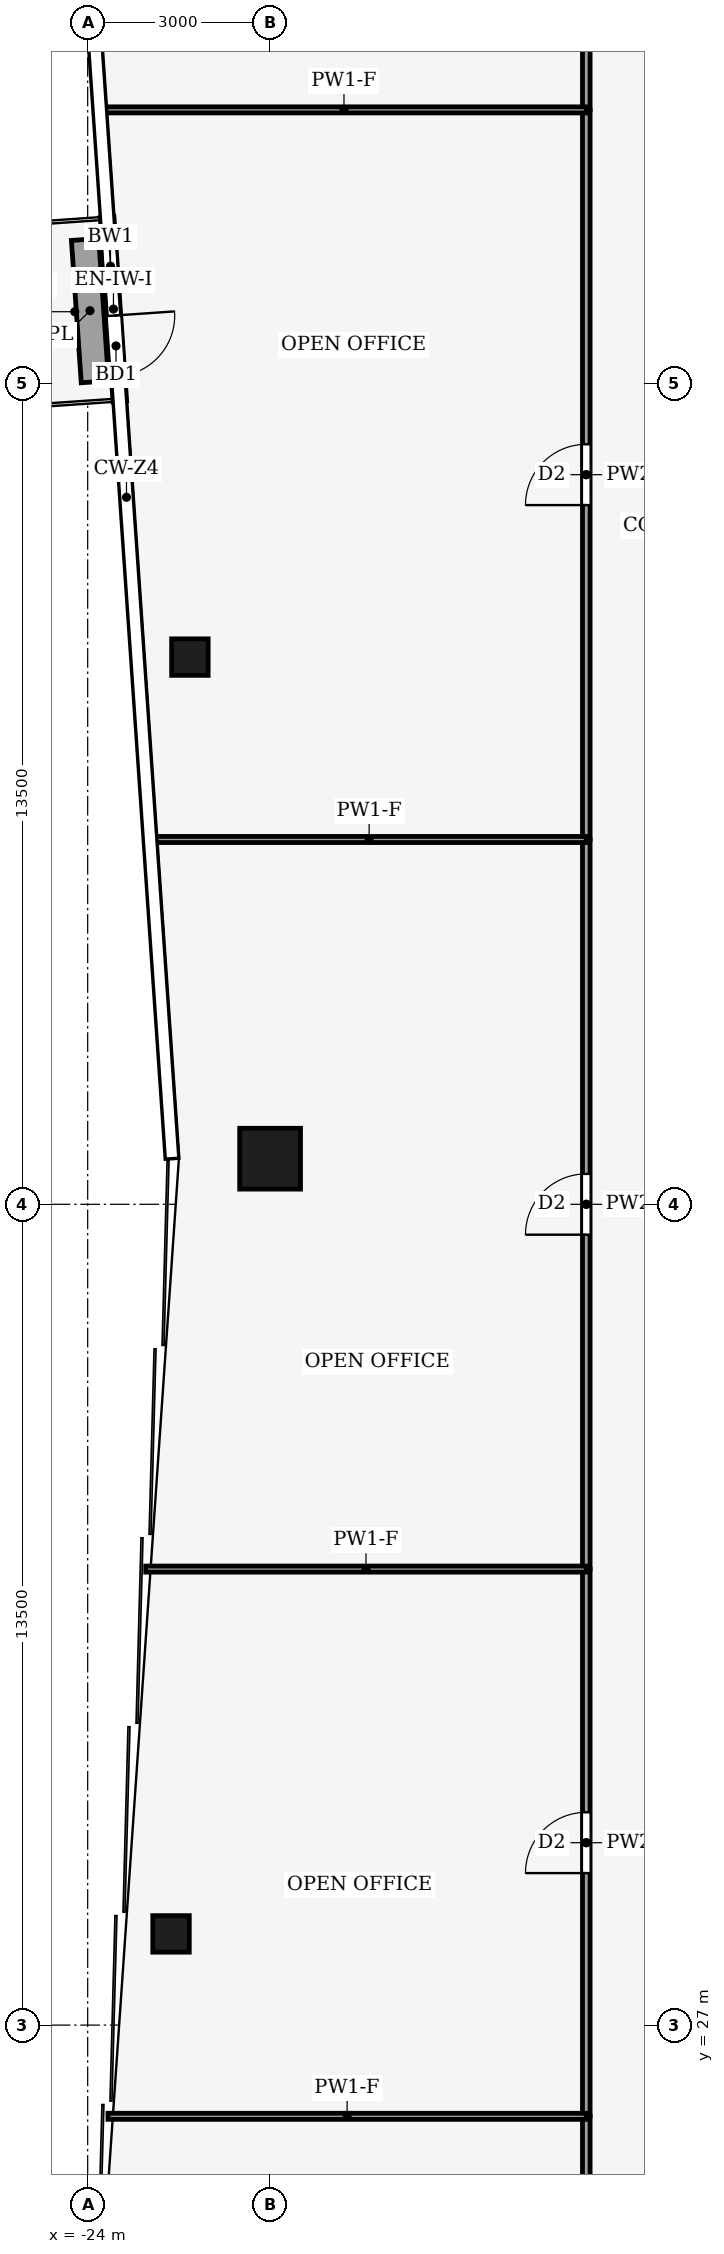
"""IFC4 building model, lengths in metres.
Left out: names, types, materials, properties, quantities, classifications, styles, units other than length and angle.
Written with IfcOpenShell. Run it as: python <this file> out.ifc"""

import sys

from ifc_helpers import new_model, si_unit, direction, frame, frame_2d, origin, origin_2d, place, context, subcontext, project, spatial, rectangle, hollow_rectangle, extrude, element, fill, save


model = new_model("IFC4")
c1 = context("Model", 3, precision=1e-05, world=origin(), true_north=direction((0.0, 1.0)))
c2 = subcontext(c1, "Body", "Model", "MODEL_VIEW")
j1 = project(units=[si_unit("LENGTHUNIT", "METRE"), si_unit("PLANEANGLEUNIT", "RADIAN")], contexts=[c1])
p1 = place(None, origin())
s1 = spatial("IfcSite", under=j1, at=p1, CompositionType="ELEMENT")
p2 = place(p1, origin())
s2 = spatial("IfcBuilding", under=s1, at=p2, CompositionType="ELEMENT")
p3 = place(p2, frame((0.0, 0.0, 246.0)))
s3 = spatial("IfcBuildingStorey", under=s2, at=p3, CompositionType="ELEMENT", Elevation=246.0)
p4 = place(p3, frame((-21.0, 41.25, 0.0), z_axis=(0.0, 0.0, 1.0), x_axis=(1.0, 0.0, 0.0)))
e1 = element("IfcColumn", 1, at=p4, inside=s3, PredefinedType="COLUMN", context=c2, shape_type="SweptSolid", body=[
    extrude(hollow_rectangle(XDim=1.0, YDim=1.0, WallThickness=0.045, at=origin_2d()), origin(), (0.0, 0.0, 1.0), 4.0),
])
for number, where, z_axis, x_axis in (
    (2, (-22.629, 28.5, 0.0), (0.0, 0.0, 1.0), (1.0, 0.0, 0.0)),
    (3, (-22.319, 49.5, 0.0), (0.0, 0.0, 1.0), (1.0, 0.0, 0.0)),
):
    element("IfcColumn", number, at=place(p3, frame(where, z_axis=z_axis, x_axis=x_axis)), inside=s3, PredefinedType="COLUMN", context=c2, shape_type="SweptSolid", body=[
        extrude(hollow_rectangle(XDim=0.6, YDim=0.6, WallThickness=0.025, at=origin_2d()), origin(), (0.0, 0.0, 1.0), 4.0),
    ])
p5 = place(p3, frame((-23.681, 56.744, 0.0), z_axis=(0.0, 0.0, 1.0), x_axis=(0.068837845086, -0.997627862023, 0.0)))
e4 = element("IfcWall", 4, at=p5, inside=s3, PredefinedType="SOLIDWALL", context=c2, shape_type="SweptSolid", body=[
    extrude(rectangle(XDim=3.047, YDim=0.224, at=frame_2d((1.523, 0.0))), origin(), (0.0, 0.0, 1.0), 3.65),
])
p6 = place(p5, frame((1.631, 0.0, 0.0)))
e5 = element("IfcOpeningElement", 5, at=p6, cuts=e4, PredefinedType="OPENING", context=c2, shape_type="SweptSolid", body=[
    extrude(rectangle(XDim=1.0, YDim=2.1, at=frame_2d((0.5, 1.05))), frame((0.0, 0.122, 0.0), z_axis=(0.0, -1.0, 0.0), x_axis=(1.0, 0.0, 0.0)), (0.0, 0.0, 1.0), 0.244),
])
p7 = place(p5, frame((0.416, 0.0, 0.9)))
e6 = element("IfcOpeningElement", 6, at=p7, cuts=e4, PredefinedType="OPENING", context=c2, shape_type="SweptSolid", body=[
    extrude(rectangle(XDim=0.8, YDim=1.2, at=frame_2d((0.4, 0.6))), frame((0.0, 0.122, 0.0), z_axis=(0.0, -1.0, 0.0), x_axis=(1.0, 0.0, 0.0)), (0.0, 0.0, 1.0), 0.244),
])
p8 = place(p3, frame((-24.043, 56.368, 0.0), z_axis=(0.0, 0.0, 1.0), x_axis=(0.068769956374, -0.997632544127, 0.0)))
e7 = element("IfcWall", 7, at=p8, inside=s3, PredefinedType="USERDEFINED", context=c2, shape_type="SweptSolid", body=[
    extrude(rectangle(XDim=2.347, YDim=0.45, at=frame_2d((1.173, 0.0))), origin(), (0.0, 0.0, 1.0), 0.4),
])
p9 = place(p3, frame((-15.8, 22.5, 0.0), z_axis=(0.0, 0.0, 1.0), x_axis=(0.0, 1.0, 0.0)))
e8 = element("IfcWall", 8, at=p9, inside=s3, PredefinedType="PARTITIONING", context=c2, shape_type="SweptSolid", body=[
    extrude(rectangle(XDim=3.0, YDim=0.125, at=frame_2d((1.5, 0.0))), origin(), (0.0, 0.0, 1.0), 3.44),
])
p10 = place(p9, frame((1.0, 0.0, 0.0)))
e9 = element("IfcOpeningElement", 9, at=p10, cuts=e8, PredefinedType="OPENING", context=c2, shape_type="SweptSolid", body=[
    extrude(rectangle(XDim=1.0, YDim=2.1, at=frame_2d((0.5, 1.05))), frame((0.0, 0.073, 0.0), z_axis=(0.0, -1.0, 0.0), x_axis=(1.0, 0.0, 0.0)), (0.0, 0.0, 1.0), 0.145),
])
p11 = place(p3, frame((-15.8, 25.5, 0.0), z_axis=(0.0, 0.0, 1.0), x_axis=(0.0, 1.0, 0.0)))
e10 = element("IfcWall", 10, at=p11, inside=s3, PredefinedType="PARTITIONING", context=c2, shape_type="SweptSolid", body=[
    extrude(rectangle(XDim=9.0, YDim=0.125, at=frame_2d((4.5, 0.0))), origin(), (0.0, 0.0, 1.0), 3.48),
])
p12 = place(p11, frame((4.0, 0.0, 0.0)))
e11 = element("IfcOpeningElement", 11, at=p12, cuts=e10, PredefinedType="OPENING", context=c2, shape_type="SweptSolid", body=[
    extrude(rectangle(XDim=1.0, YDim=2.1, at=frame_2d((0.5, 1.05))), frame((0.0, 0.073, 0.0), z_axis=(0.0, -1.0, 0.0), x_axis=(1.0, 0.0, 0.0)), (0.0, 0.0, 1.0), 0.145),
])
p13 = place(p3, frame((-15.8, 34.5, 0.0), z_axis=(0.0, 0.0, 1.0), x_axis=(0.0, 1.0, 0.0)))
e12 = element("IfcWall", 12, at=p13, inside=s3, PredefinedType="PARTITIONING", context=c2, shape_type="SweptSolid", body=[
    extrude(rectangle(XDim=12.0, YDim=0.125, at=frame_2d((6.0, 0.0))), origin(), (0.0, 0.0, 1.0), 3.14),
])
p14 = place(p13, frame((5.5, 0.0, 0.0)))
e13 = element("IfcOpeningElement", 13, at=p14, cuts=e12, PredefinedType="OPENING", context=c2, shape_type="SweptSolid", body=[
    extrude(rectangle(XDim=1.0, YDim=2.1, at=frame_2d((0.5, 1.05))), frame((0.0, 0.073, 0.0), z_axis=(0.0, -1.0, 0.0), x_axis=(1.0, 0.0, 0.0)), (0.0, 0.0, 1.0), 0.145),
])
p15 = place(p3, frame((-15.8, 46.5, 0.0), z_axis=(0.0, 0.0, 1.0), x_axis=(0.0, 1.0, 0.0)))
e14 = element("IfcWall", 14, at=p15, inside=s3, PredefinedType="PARTITIONING", context=c2, shape_type="SweptSolid", body=[
    extrude(rectangle(XDim=12.0, YDim=0.125, at=frame_2d((6.0, 0.0))), origin(), (0.0, 0.0, 1.0), 3.24),
])
p16 = place(p15, frame((5.5, 0.0, 0.0)))
e15 = element("IfcOpeningElement", 15, at=p16, cuts=e14, PredefinedType="OPENING", context=c2, shape_type="SweptSolid", body=[
    extrude(rectangle(XDim=1.0, YDim=2.1, at=frame_2d((0.5, 1.05))), frame((0.0, 0.073, 0.0), z_axis=(0.0, -1.0, 0.0), x_axis=(1.0, 0.0, 0.0)), (0.0, 0.0, 1.0), 0.145),
])
p17 = place(p3, frame((-15.8, 58.5, 0.0), z_axis=(0.0, 0.0, 1.0), x_axis=(0.0, 1.0, 0.0)))
e16 = element("IfcWall", 16, at=p17, inside=s3, PredefinedType="PARTITIONING", context=c2, shape_type="SweptSolid", body=[
    extrude(rectangle(XDim=10.397, YDim=0.125, at=frame_2d((5.198, 0.0))), origin(), (0.0, 0.0, 1.0), 3.04),
])
p18 = place(p17, frame((4.633, 0.0, 0.0)))
e17 = element("IfcOpeningElement", 17, at=p18, cuts=e16, PredefinedType="OPENING", context=c2, shape_type="SweptSolid", body=[
    extrude(rectangle(XDim=1.0, YDim=2.1, at=frame_2d((0.5, 1.05))), frame((0.0, 0.073, 0.0), z_axis=(0.0, -1.0, 0.0), x_axis=(1.0, 0.0, 0.0)), (0.0, 0.0, 1.0), 0.145),
])
p19 = place(p3, frame((-15.8, 25.5, 0.0), z_axis=(0.0, 0.0, 1.0), x_axis=(-1.0, 0.0, 0.0)))
e18 = element("IfcWall", 18, at=p19, inside=s3, PredefinedType="PARTITIONING", context=c2, shape_type="SweptSolid", body=[
    extrude(rectangle(XDim=7.866, YDim=0.1, at=frame_2d((3.933, 0.0))), origin(), (0.0, 0.0, 1.0), 3.04),
])
p20 = place(p3, frame((-15.8, 34.5, 0.0), z_axis=(0.0, 0.0, 1.0), x_axis=(-1.0, 0.0, 0.0)))
e19 = element("IfcWall", 19, at=p20, inside=s3, PredefinedType="PARTITIONING", context=c2, shape_type="SweptSolid", body=[
    extrude(rectangle(XDim=7.245, YDim=0.1, at=frame_2d((3.623, 0.0))), origin(), (0.0, 0.0, 1.0), 3.04),
])
p21 = place(p3, frame((-15.8, 46.5, 0.0), z_axis=(0.0, 0.0, 1.0), x_axis=(-1.0, 0.0, 0.0)))
e20 = element("IfcWall", 20, at=p21, inside=s3, PredefinedType="PARTITIONING", context=c2, shape_type="SweptSolid", body=[
    extrude(rectangle(XDim=7.142, YDim=0.1, at=frame_2d((3.571, 0.0))), origin(), (0.0, 0.0, 1.0), 3.04),
])
p22 = place(p3, frame((-15.8, 58.5, 0.0), z_axis=(0.0, 0.0, 1.0), x_axis=(-1.0, 0.0, 0.0)))
e21 = element("IfcWall", 21, at=p22, inside=s3, PredefinedType="PARTITIONING", context=c2, shape_type="SweptSolid", body=[
    extrude(rectangle(XDim=7.97, YDim=0.1, at=frame_2d((3.985, 0.0))), origin(), (0.0, 0.0, 1.0), 3.04),
])
p23 = place(p6, origin())
e22 = element("IfcDoor", 22, at=p23, inside=s3, OperationType="SINGLE_SWING_RIGHT", PredefinedType="DOOR", context=c2, shape_type="SweptSolid", body=[
    extrude(rectangle(XDim=1.0, YDim=2.1, at=frame_2d((0.5, 1.05))), frame((0.0, 0.025, 0.0), z_axis=(0.0, -1.0, 0.0), x_axis=(1.0, 0.0, 0.0)), (0.0, 0.0, 1.0), 0.05),
])
fill(e5, e22)
p24 = place(p7, origin())
e23 = element("IfcWindow", 23, at=p24, inside=s3, PartitioningType="SINGLE_PANEL", PredefinedType="WINDOW", context=c2, shape_type="SweptSolid", body=[
    extrude(rectangle(XDim=0.8, YDim=1.2, at=frame_2d((0.4, 0.6))), frame((0.0, 0.03, 0.0), z_axis=(0.0, -1.0, 0.0), x_axis=(1.0, 0.0, 0.0)), (0.0, 0.0, 1.0), 0.06),
])
fill(e6, e23)
p25 = place(p12, origin())
e24 = element("IfcDoor", 24, at=p25, inside=s3, OperationType="SINGLE_SWING_LEFT", PredefinedType="DOOR", context=c2, shape_type="SweptSolid", body=[
    extrude(rectangle(XDim=1.0, YDim=2.1, at=frame_2d((0.5, 1.05))), frame((0.0, 0.025, 0.0), z_axis=(0.0, -1.0, 0.0), x_axis=(1.0, 0.0, 0.0)), (0.0, 0.0, 1.0), 0.05),
])
fill(e11, e24)
p26 = place(p14, origin())
e25 = element("IfcDoor", 25, at=p26, inside=s3, OperationType="SINGLE_SWING_RIGHT", PredefinedType="DOOR", context=c2, shape_type="SweptSolid", body=[
    extrude(rectangle(XDim=1.0, YDim=2.1, at=frame_2d((0.5, 1.05))), frame((0.0, 0.025, 0.0), z_axis=(0.0, -1.0, 0.0), x_axis=(1.0, 0.0, 0.0)), (0.0, 0.0, 1.0), 0.05),
])
fill(e13, e25)
p27 = place(p16, origin())
e26 = element("IfcDoor", 26, at=p27, inside=s3, OperationType="SINGLE_SWING_LEFT", PredefinedType="DOOR", context=c2, shape_type="SweptSolid", body=[
    extrude(rectangle(XDim=1.0, YDim=2.1, at=frame_2d((0.5, 1.05))), frame((0.0, 0.025, 0.0), z_axis=(0.0, -1.0, 0.0), x_axis=(1.0, 0.0, 0.0)), (0.0, 0.0, 1.0), 0.05),
])
fill(e15, e26)
save(model, sys.argv[1])
